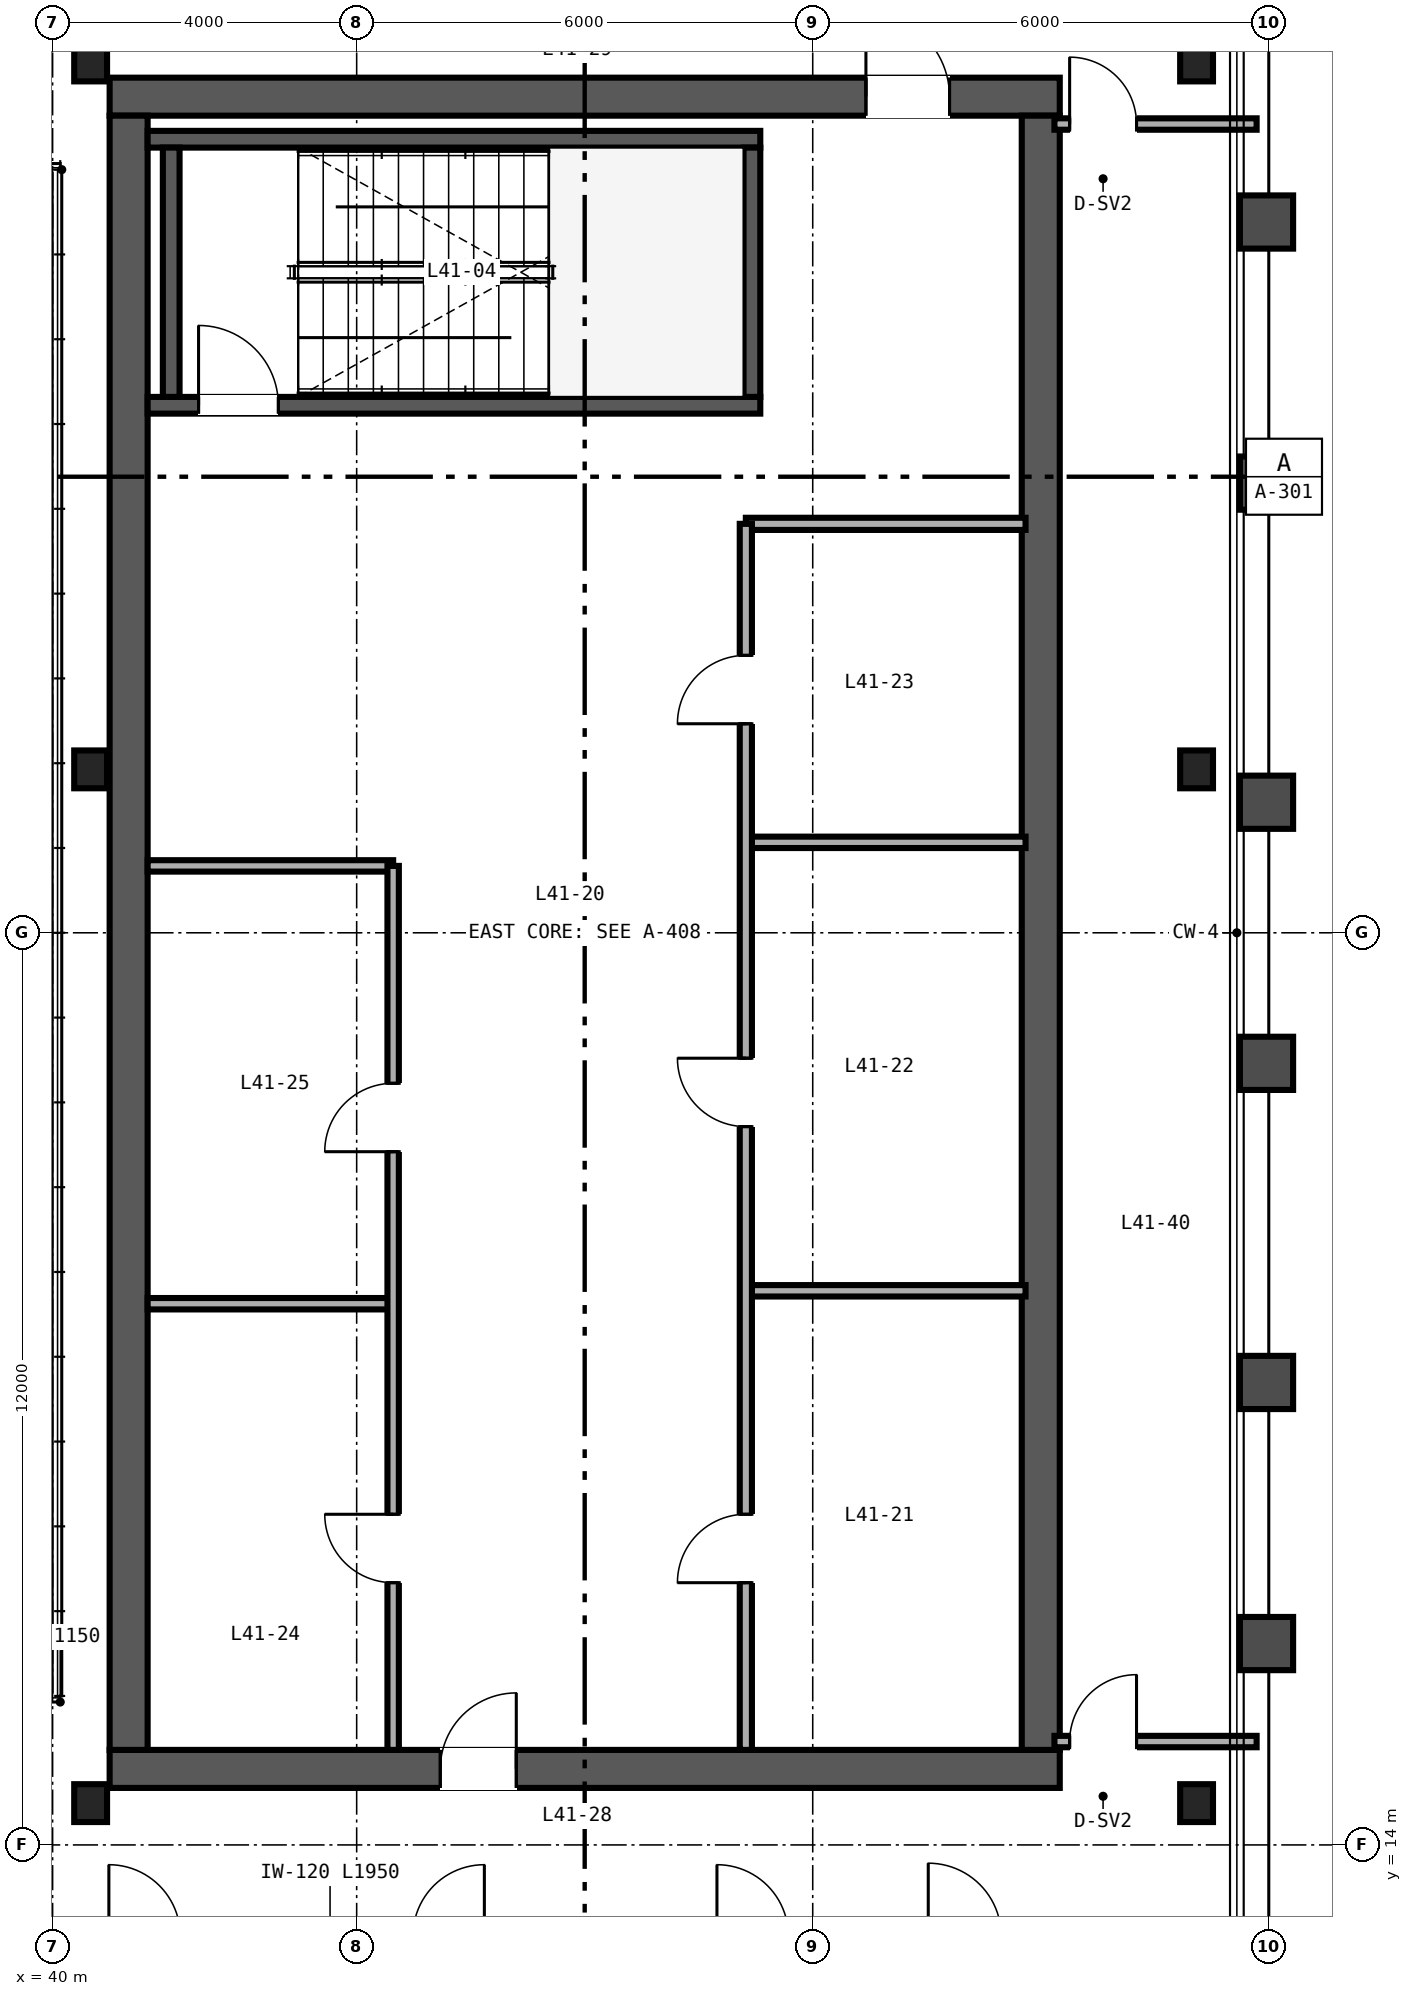
"""IFC4 building model, lengths in metres.
Left out: names, types, materials, properties, quantities, classifications, styles, units other than length and angle.
Written with IfcOpenShell. Run it as: python <this file> out.ifc"""

import sys

from ifc_helpers import new_model, si_unit, direction, frame, frame_2d, origin, origin_2d, place, context, subcontext, project, spatial, rectangle, i_section, extrude, source, transform, mapped, element, fill, save


model = new_model("IFC4")
c1 = context("Model", 3, precision=1e-05, world=origin(), true_north=direction((0.0, 1.0)))
c2 = subcontext(c1, "Body", "Model", "MODEL_VIEW")
j1 = project(units=[si_unit("LENGTHUNIT", "METRE"), si_unit("PLANEANGLEUNIT", "RADIAN")], contexts=[c1])
p1 = place(None, origin())
s1 = spatial("IfcSite", under=j1, at=p1, CompositionType="ELEMENT")
p2 = place(p1, origin())
s2 = spatial("IfcBuilding", under=s1, at=p2, CompositionType="ELEMENT")
p3 = place(p2, frame((0.0, 0.0, 166.8)))
s3 = spatial("IfcBuildingStorey", under=s2, at=p3, CompositionType="ELEMENT", Elevation=166.8)
p4 = place(p3, frame((40.75, 15.0, 0.0), z_axis=(0.0, 0.0, 1.0), x_axis=(1.0, 0.0, 0.0)))
e1 = element("IfcWall", 1, at=p4, inside=s3, PredefinedType="SHEAR", context=c2, shape_type="SweptSolid", body=[
    extrude(rectangle(XDim=12.5, YDim=0.5, at=frame_2d((6.25, 0.0))), origin(), (0.0, 0.0, 1.0), 3.37),
])
p5 = place(p4, frame((4.35, 0.0, 0.0)))
e2 = element("IfcOpeningElement", 2, at=p5, cuts=e1, PredefinedType="OPENING", context=c2, shape_type="SweptSolid", body=[
    extrude(rectangle(XDim=1.0, YDim=2.15, at=frame_2d((0.5, 1.075))), frame((0.0, 0.26, 0.0), z_axis=(0.0, -1.0, 0.0), x_axis=(1.0, 0.0, 0.0)), (0.0, 0.0, 1.0), 0.52),
])
p6 = place(p3, frame((40.75, 37.0, 0.0), z_axis=(0.0, 0.0, 1.0), x_axis=(1.0, 0.0, 0.0)))
e3 = element("IfcWall", 3, at=p6, inside=s3, PredefinedType="SHEAR", context=c2, shape_type="SweptSolid", body=[
    extrude(rectangle(XDim=12.5, YDim=0.5, at=frame_2d((6.25, 0.0))), origin(), (0.0, 0.0, 1.0), 3.37),
])
p7 = place(p6, frame((9.95, 0.0, 0.0)))
e4 = element("IfcOpeningElement", 4, at=p7, cuts=e3, PredefinedType="OPENING", context=c2, shape_type="SweptSolid", body=[
    extrude(rectangle(XDim=1.1, YDim=2.15, at=frame_2d((0.55, 1.075))), frame((0.0, 0.26, 0.0), z_axis=(0.0, -1.0, 0.0), x_axis=(1.0, 0.0, 0.0)), (0.0, 0.0, 1.0), 0.52),
])
for number, where, z_axis, x_axis in (
    (5, (41.0, 15.25, 0.0), (0.0, 0.0, 1.0), (0.0, 1.0, 0.0)),
    (6, (53.0, 15.25, 0.0), (0.0, 0.0, 1.0), (0.0, 1.0, 0.0)),
):
    element("IfcWall", number, at=place(p3, frame(where, z_axis=z_axis, x_axis=x_axis)), inside=s3, PredefinedType="SHEAR", context=c2, shape_type="SweptSolid", body=[
        extrude(rectangle(XDim=21.5, YDim=0.5, at=frame_2d((10.75, 0.0))), origin(), (0.0, 0.0, 1.0), 3.37),
    ])
p8 = place(p3, frame((41.25, 32.94, 0.0), z_axis=(0.0, 0.0, 1.0), x_axis=(1.0, 0.0, 0.0)))
e7 = element("IfcWall", 7, at=p8, inside=s3, PredefinedType="SHEAR", context=c2, shape_type="SweptSolid", body=[
    extrude(rectangle(XDim=8.06, YDim=0.22, at=frame_2d((4.03, 0.0))), origin(), (0.0, 0.0, 1.0), 3.4),
])
p9 = place(p8, frame((0.67, 0.0, 0.0)))
e8 = element("IfcOpeningElement", 8, at=p9, cuts=e7, PredefinedType="OPENING", context=c2, shape_type="SweptSolid", body=[
    extrude(rectangle(XDim=1.05, YDim=2.15, at=frame_2d((0.525, 1.075))), frame((0.0, 0.12, 0.0), z_axis=(0.0, -1.0, 0.0), x_axis=(1.0, 0.0, 0.0)), (0.0, 0.0, 1.0), 0.24),
])
p10 = place(p3, frame((41.25, 36.44, 0.0), z_axis=(0.0, 0.0, 1.0), x_axis=(1.0, 0.0, 0.0)))
e9 = element("IfcWall", 9, at=p10, inside=s3, PredefinedType="SHEAR", context=c2, shape_type="SweptSolid", body=[
    extrude(rectangle(XDim=8.06, YDim=0.22, at=frame_2d((4.03, 0.0))), origin(), (0.0, 0.0, 1.0), 3.4),
])
for number, where, z_axis, x_axis in (
    (10, (41.56, 33.05, 0.0), (0.0, 0.0, 1.0), (0.0, 1.0, 0.0)),
    (11, (49.2, 33.05, 0.0), (0.0, 0.0, 1.0), (0.0, 1.0, 0.0)),
):
    element("IfcWall", number, at=place(p3, frame(where, z_axis=z_axis, x_axis=x_axis)), inside=s3, PredefinedType="SHEAR", context=c2, shape_type="SweptSolid", body=[
        extrude(rectangle(XDim=3.28, YDim=0.22, at=frame_2d((1.64, 0.0))), origin(), (0.0, 0.0, 1.0), 3.4),
    ])
m1 = source(origin(), c2, "Body", "SweptSolid", [
    extrude(i_section(OverallWidth=0.432, OverallDepth=0.498, WebThickness=0.056, FlangeThickness=0.089, FilletRadius=0.025, at=origin_2d()), origin(), (0.0, 0.0, 1.0), 3.37),
])
for number, where, z_axis, x_axis in (
    (12, (40.5, 14.55, 0.0), (0.0, 0.0, 1.0), (1.0, 0.0, 0.0)),
    (13, (55.05, 14.55, 0.0), (0.0, 0.0, 1.0), (1.0, 0.0, 0.0)),
    (14, (40.5, 28.15, 0.0), (0.0, 0.0, 1.0), (1.0, 0.0, 0.0)),
    (15, (55.05, 28.15, 0.0), (0.0, 0.0, 1.0), (1.0, 0.0, 0.0)),
    (16, (40.5, 37.45, 0.0), (0.0, 0.0, 1.0), (1.0, 0.0, 0.0)),
    (17, (55.05, 37.45, 0.0), (0.0, 0.0, 1.0), (1.0, 0.0, 0.0)),
):
    element("IfcColumn", number, at=place(p3, frame(where, z_axis=z_axis, x_axis=x_axis)), inside=s3, PredefinedType="COLUMN", context=c2, shape_type="MappedRepresentation", body=[
        mapped(m1, transform((0.0, 0.0, 0.0), scale=1.0)),
    ])
p11 = place(p3, frame((49.12, 31.38, 0.0), z_axis=(0.0, 0.0, 1.0), x_axis=(1.0, 0.0, 0.0)))
e18 = element("IfcWall", 18, at=p11, inside=s3, PredefinedType="PARTITIONING", context=c2, shape_type="SweptSolid", body=[
    extrude(rectangle(XDim=3.68, YDim=0.16, at=frame_2d((1.84, 0.0))), origin(), (0.0, 0.0, 1.0), 2.47),
])
for number, where, z_axis, x_axis in (
    (19, (49.12, 21.29, 0.0), (0.0, 0.0, 1.0), (1.0, 0.0, 0.0)),
    (20, (49.12, 27.19, 0.0), (0.0, 0.0, 1.0), (1.0, 0.0, 0.0)),
):
    element("IfcWall", number, at=place(p3, frame(where, z_axis=z_axis, x_axis=x_axis)), inside=s3, PredefinedType="PARTITIONING", context=c2, shape_type="SweptSolid", body=[
        extrude(rectangle(XDim=3.68, YDim=0.15, at=frame_2d((1.84, 0.0))), origin(), (0.0, 0.0, 1.0), 3.37),
    ])
p12 = place(p3, frame((49.12, 15.25, 0.0), z_axis=(0.0, 0.0, 1.0), x_axis=(0.0, 1.0, 0.0)))
e21 = element("IfcWall", 21, at=p12, inside=s3, PredefinedType="PARTITIONING", context=c2, shape_type="SweptSolid", body=[
    extrude(rectangle(XDim=16.13, YDim=0.16, at=frame_2d((8.065, 0.0))), origin(), (0.0, 0.0, 1.0), 2.443),
])
p13 = place(p12, frame((2.2, 0.0, 0.0)))
e22 = element("IfcOpeningElement", 22, at=p13, cuts=e21, PredefinedType="OPENING", context=c2, shape_type="SweptSolid", body=[
    extrude(rectangle(XDim=0.9, YDim=2.15, at=frame_2d((0.45, 1.075))), frame((0.0, 0.09, 0.0), z_axis=(0.0, -1.0, 0.0), x_axis=(1.0, 0.0, 0.0)), (0.0, 0.0, 1.0), 0.18),
])
p14 = place(p12, frame((8.2, 0.0, 0.0)))
e23 = element("IfcOpeningElement", 23, at=p14, cuts=e21, PredefinedType="OPENING", context=c2, shape_type="SweptSolid", body=[
    extrude(rectangle(XDim=0.9, YDim=2.15, at=frame_2d((0.45, 1.075))), frame((0.0, 0.09, 0.0), z_axis=(0.0, -1.0, 0.0), x_axis=(1.0, 0.0, 0.0)), (0.0, 0.0, 1.0), 0.18),
])
p15 = place(p12, frame((13.5, 0.0, 0.0)))
e24 = element("IfcOpeningElement", 24, at=p15, cuts=e21, PredefinedType="OPENING", context=c2, shape_type="SweptSolid", body=[
    extrude(rectangle(XDim=0.9, YDim=2.15, at=frame_2d((0.45, 1.075))), frame((0.0, 0.09, 0.0), z_axis=(0.0, -1.0, 0.0), x_axis=(1.0, 0.0, 0.0)), (0.0, 0.0, 1.0), 0.18),
])
for number, where, z_axis, x_axis in (
    (25, (41.25, 26.88, 0.0), (0.0, 0.0, 1.0), (1.0, 0.0, 0.0)),
    (26, (41.25, 21.12, 0.0), (0.0, 0.0, 1.0), (1.0, 0.0, 0.0)),
):
    element("IfcWall", number, at=place(p3, frame(where, z_axis=z_axis, x_axis=x_axis)), inside=s3, PredefinedType="PARTITIONING", context=c2, shape_type="SweptSolid", body=[
        extrude(rectangle(XDim=3.23, YDim=0.15, at=frame_2d((1.615, 0.0))), origin(), (0.0, 0.0, 1.0), 3.37),
    ])
p16 = place(p3, frame((44.48, 15.25, 0.0), z_axis=(0.0, 0.0, 1.0), x_axis=(0.0, 1.0, 0.0)))
e27 = element("IfcWall", 27, at=p16, inside=s3, PredefinedType="PARTITIONING", context=c2, shape_type="SweptSolid", body=[
    extrude(rectangle(XDim=11.63, YDim=0.15, at=frame_2d((5.815, 0.0))), origin(), (0.0, 0.0, 1.0), 3.37),
])
p17 = place(p16, frame((2.2, 0.0, 0.0)))
e28 = element("IfcOpeningElement", 28, at=p17, cuts=e27, PredefinedType="OPENING", context=c2, shape_type="SweptSolid", body=[
    extrude(rectangle(XDim=0.9, YDim=2.15, at=frame_2d((0.45, 1.075))), frame((0.0, 0.085, 0.0), z_axis=(0.0, -1.0, 0.0), x_axis=(1.0, 0.0, 0.0)), (0.0, 0.0, 1.0), 0.17),
])
p18 = place(p16, frame((7.87, 0.0, 0.0)))
e29 = element("IfcOpeningElement", 29, at=p18, cuts=e27, PredefinedType="OPENING", context=c2, shape_type="SweptSolid", body=[
    extrude(rectangle(XDim=0.9, YDim=2.15, at=frame_2d((0.45, 1.075))), frame((0.0, 0.085, 0.0), z_axis=(0.0, -1.0, 0.0), x_axis=(1.0, 0.0, 0.0)), (0.0, 0.0, 1.0), 0.17),
])
p19 = place(p3, frame((53.18, 15.36, 0.0), z_axis=(0.0, 0.0, 1.0), x_axis=(1.0, 0.0, 0.0)))
e30 = element("IfcWall", 30, at=p19, inside=s3, PredefinedType="PARTITIONING", context=c2, shape_type="SweptSolid", body=[
    extrude(rectangle(XDim=2.66, YDim=0.15, at=frame_2d((1.33, 0.0))), origin(), (0.0, 0.0, 1.0), 2.591),
])
p20 = place(p19, frame((0.2, 0.0, 0.0)))
e31 = element("IfcOpeningElement", 31, at=p20, cuts=e30, PredefinedType="OPENING", context=c2, shape_type="SweptSolid", body=[
    extrude(rectangle(XDim=0.88, YDim=2.15, at=frame_2d((0.44, 1.075))), frame((0.0, 0.085, 0.0), z_axis=(0.0, -1.0, 0.0), x_axis=(1.0, 0.0, 0.0)), (0.0, 0.0, 1.0), 0.17),
])
p21 = place(p3, frame((53.18, 36.64, 0.0), z_axis=(0.0, 0.0, 1.0), x_axis=(1.0, 0.0, 0.0)))
e32 = element("IfcWall", 32, at=p21, inside=s3, PredefinedType="PARTITIONING", context=c2, shape_type="SweptSolid", body=[
    extrude(rectangle(XDim=2.66, YDim=0.15, at=frame_2d((1.33, 0.0))), origin(), (0.0, 0.0, 1.0), 2.753),
])
p22 = place(p21, frame((0.2, 0.0, 0.0)))
e33 = element("IfcOpeningElement", 33, at=p22, cuts=e32, PredefinedType="OPENING", context=c2, shape_type="SweptSolid", body=[
    extrude(rectangle(XDim=0.88, YDim=2.15, at=frame_2d((0.44, 1.075))), frame((0.0, 0.085, 0.0), z_axis=(0.0, -1.0, 0.0), x_axis=(1.0, 0.0, 0.0)), (0.0, 0.0, 1.0), 0.17),
])
m2 = source(origin(), c2, "Body", "SweptSolid", [
    extrude(rectangle(XDim=1.05, YDim=2.15, at=frame_2d((0.525, 1.075))), frame((0.0, 0.025, 0.0), z_axis=(0.0, -1.0, 0.0), x_axis=(1.0, 0.0, 0.0)), (0.0, 0.0, 1.0), 0.05),
])
p23 = place(p9, origin())
e34 = element("IfcDoor", 34, at=p23, inside=s3, OperationType="SINGLE_SWING_LEFT", PredefinedType="DOOR", context=c2, shape_type="MappedRepresentation", body=[
    mapped(m2, transform((0.0, 0.0, 0.0), scale=1.0)),
])
fill(e8, e34)
m3 = source(origin(), c2, "Body", "SweptSolid", [
    extrude(rectangle(XDim=1.0, YDim=2.15, at=frame_2d((0.5, 1.075))), frame((0.0, 0.025, 0.0), z_axis=(0.0, -1.0, 0.0), x_axis=(1.0, 0.0, 0.0)), (0.0, 0.0, 1.0), 0.05),
])
p24 = place(p5, origin())
e35 = element("IfcDoor", 35, at=p24, inside=s3, OperationType="SINGLE_SWING_RIGHT", PredefinedType="DOOR", context=c2, shape_type="MappedRepresentation", body=[
    mapped(m3, transform((0.0, 0.0, 0.0), scale=1.0)),
])
fill(e2, e35)
m4 = source(origin(), c2, "Body", "SweptSolid", [
    extrude(rectangle(XDim=1.1, YDim=2.15, at=frame_2d((0.55, 1.075))), frame((0.0, 0.025, 0.0), z_axis=(0.0, -1.0, 0.0), x_axis=(1.0, 0.0, 0.0)), (0.0, 0.0, 1.0), 0.05),
])
p25 = place(p7, origin())
e36 = element("IfcDoor", 36, at=p25, inside=s3, OperationType="SINGLE_SWING_LEFT", PredefinedType="DOOR", context=c2, shape_type="MappedRepresentation", body=[
    mapped(m4, transform((0.0, 0.0, 0.0), scale=1.0)),
])
fill(e4, e36)
m5 = source(origin(), c2, "Body", "SweptSolid", [
    extrude(rectangle(XDim=0.9, YDim=2.15, at=frame_2d((0.45, 1.075))), frame((0.0, 0.025, 0.0), z_axis=(0.0, -1.0, 0.0), x_axis=(1.0, 0.0, 0.0)), (0.0, 0.0, 1.0), 0.05),
])
p26 = place(p13, origin())
e37 = element("IfcDoor", 37, at=p26, inside=s3, OperationType="SINGLE_SWING_LEFT", PredefinedType="DOOR", context=c2, shape_type="MappedRepresentation", body=[
    mapped(m5, transform((0.0, 0.0, 0.0), scale=1.0)),
])
fill(e22, e37)
p27 = place(p14, origin())
e38 = element("IfcDoor", 38, at=p27, inside=s3, OperationType="SINGLE_SWING_RIGHT", PredefinedType="DOOR", context=c2, shape_type="MappedRepresentation", body=[
    mapped(m5, transform((0.0, 0.0, 0.0), scale=1.0)),
])
fill(e23, e38)
p28 = place(p15, origin())
e39 = element("IfcDoor", 39, at=p28, inside=s3, OperationType="SINGLE_SWING_LEFT", PredefinedType="DOOR", context=c2, shape_type="MappedRepresentation", body=[
    mapped(m5, transform((0.0, 0.0, 0.0), scale=1.0)),
])
fill(e24, e39)
p29 = place(p17, origin())
e40 = element("IfcDoor", 40, at=p29, inside=s3, OperationType="SINGLE_SWING_RIGHT", PredefinedType="DOOR", context=c2, shape_type="MappedRepresentation", body=[
    mapped(m5, transform((0.0, 0.0, 0.0), scale=1.0)),
])
fill(e28, e40)
p30 = place(p18, origin())
e41 = element("IfcDoor", 41, at=p30, inside=s3, OperationType="SINGLE_SWING_LEFT", PredefinedType="DOOR", context=c2, shape_type="MappedRepresentation", body=[
    mapped(m5, transform((0.0, 0.0, 0.0), scale=1.0)),
])
fill(e29, e41)
m6 = source(origin(), c2, "Body", "SweptSolid", [
    extrude(rectangle(XDim=0.88, YDim=2.15, at=frame_2d((0.44, 1.075))), frame((0.0, 0.025, 0.0), z_axis=(0.0, -1.0, 0.0), x_axis=(1.0, 0.0, 0.0)), (0.0, 0.0, 1.0), 0.05),
])
p31 = place(p20, origin())
e42 = element("IfcDoor", 42, at=p31, inside=s3, OperationType="SINGLE_SWING_RIGHT", PredefinedType="DOOR", context=c2, shape_type="MappedRepresentation", body=[
    mapped(m6, transform((0.0, 0.0, 0.0), scale=1.0)),
])
fill(e31, e42)
p32 = place(p22, origin())
e43 = element("IfcDoor", 43, at=p32, inside=s3, OperationType="SINGLE_SWING_LEFT", PredefinedType="DOOR", context=c2, shape_type="MappedRepresentation", body=[
    mapped(m6, transform((0.0, 0.0, 0.0), scale=1.0)),
])
fill(e33, e43)
save(model, sys.argv[1])
